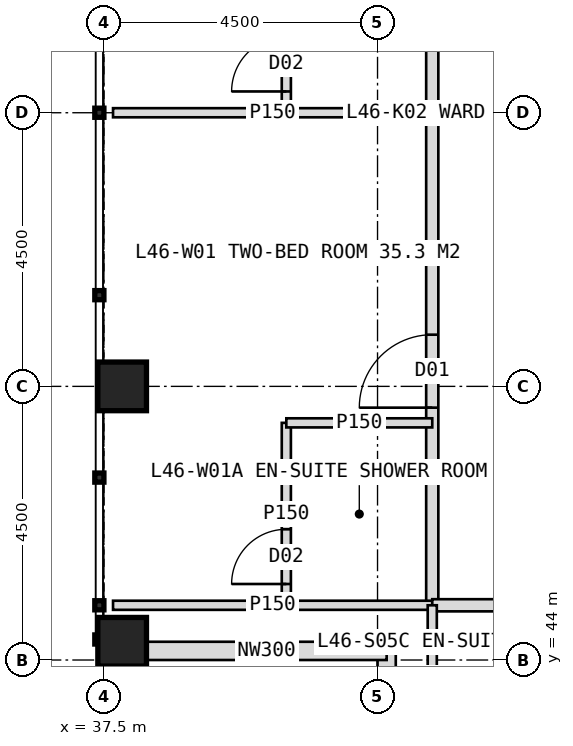
"""IFC4 building model, lengths in metres.
Left out: names, types, materials, properties, quantities, classifications, styles, units other than length and angle.
Written with IfcOpenShell. Run it as: python <this file> out.ifc"""

import sys

from ifc_helpers import new_model, si_unit, direction, frame, frame_2d, origin, origin_2d, place, context, subcontext, project, spatial, rectangle, hollow_rectangle, extrude, element, fill, save


model = new_model("IFC4")
c1 = context("Model", 3, precision=1e-05, world=origin(), true_north=direction((0.0, 1.0)))
c2 = subcontext(c1, "Body", "Model", "MODEL_VIEW")
j1 = project(units=[si_unit("LENGTHUNIT", "METRE"), si_unit("PLANEANGLEUNIT", "RADIAN")], contexts=[c1])
p1 = place(None, origin())
s1 = spatial("IfcSite", under=j1, at=p1, CompositionType="ELEMENT")
p2 = place(p1, origin())
s2 = spatial("IfcBuilding", under=s1, at=p2, CompositionType="ELEMENT")
p3 = place(p2, frame((0.0, 0.0, 193.0)))
s3 = spatial("IfcBuildingStorey", under=s2, at=p3, CompositionType="ELEMENT", Elevation=193.0)
for number, where, z_axis, x_axis in (
    (1, (37.8, 44.3, 0.0), (0.0, 0.0, 1.0), (1.0, 0.0, 0.0)),
    (2, (37.8, 48.5, 0.0), (0.0, 0.0, 1.0), (1.0, 0.0, 0.0)),
):
    element("IfcColumn", number, at=place(p3, frame(where, z_axis=z_axis, x_axis=x_axis)), inside=s3, PredefinedType="COLUMN", context=c2, shape_type="SweptSolid", body=[
        extrude(hollow_rectangle(XDim=0.8, YDim=0.8, WallThickness=0.08, at=origin_2d()), origin(), (0.0, 0.0, 1.0), 4.0),
    ])
for number, where, z_axis, x_axis in (
    (3, (42.15, 40.2, 0.0), (0.0, 0.0, 1.0), (0.0, 1.0, 0.0)),
    (4, (42.15, 44.15, 0.0), (0.0, 0.0, 1.0), (-1.0, 0.0, 0.0)),
):
    element("IfcWall", number, at=place(p3, frame(where, z_axis=z_axis, x_axis=x_axis)), inside=s3, PredefinedType="ELEMENTEDWALL", context=c2, shape_type="SweptSolid", body=[
        extrude(rectangle(XDim=3.95, YDim=0.3, at=frame_2d((1.975, 0.0))), origin(), (0.0, 0.0, 1.0), 2.85),
    ])
p4 = place(p3, frame((42.9, 53.0, 0.0), z_axis=(0.0, 0.0, 1.0), x_axis=(-1.0, 0.0, 0.0)))
e5 = element("IfcWall", 5, at=p4, inside=s3, PredefinedType="PARTITIONING", context=c2, shape_type="SweptSolid", body=[
    extrude(rectangle(XDim=5.25, YDim=0.15, at=frame_2d((2.625, 0.0))), origin(), (0.0, 0.0, 1.0), 3.75),
])
p5 = place(p3, frame((42.9, 44.9, 0.0), z_axis=(0.0, 0.0, 1.0), x_axis=(0.0, 1.0, 0.0)))
e6 = element("IfcWall", 6, at=p5, inside=s3, PredefinedType="PARTITIONING", context=c2, shape_type="SweptSolid", body=[
    extrude(rectangle(XDim=34.2, YDim=0.2, at=frame_2d((17.1, 0.0))), origin(), (0.0, 0.0, 1.0), 3.75),
])
p6 = place(p5, frame((3.25, 0.0, 0.0)))
e7 = element("IfcOpeningElement", 7, at=p6, cuts=e6, PredefinedType="OPENING", context=c2, shape_type="SweptSolid", body=[
    extrude(rectangle(XDim=1.2, YDim=2.2, at=frame_2d((0.6, 1.1))), frame((0.0, 0.11, 0.0), z_axis=(0.0, -1.0, 0.0), x_axis=(1.0, 0.0, 0.0)), (0.0, 0.0, 1.0), 0.22),
])
p7 = place(p5, frame((11.35, 0.0, 0.0)))
e8 = element("IfcOpeningElement", 8, at=p7, cuts=e6, PredefinedType="OPENING", context=c2, shape_type="SweptSolid", body=[
    extrude(rectangle(XDim=1.2, YDim=2.2, at=frame_2d((0.6, 1.1))), frame((0.0, 0.11, 0.0), z_axis=(0.0, -1.0, 0.0), x_axis=(1.0, 0.0, 0.0)), (0.0, 0.0, 1.0), 0.22),
])
p8 = place(p5, frame((20.35, 0.0, 0.0)))
e9 = element("IfcOpeningElement", 9, at=p8, cuts=e6, PredefinedType="OPENING", context=c2, shape_type="SweptSolid", body=[
    extrude(rectangle(XDim=1.2, YDim=2.2, at=frame_2d((0.6, 1.1))), frame((0.0, 0.11, 0.0), z_axis=(0.0, -1.0, 0.0), x_axis=(1.0, 0.0, 0.0)), (0.0, 0.0, 1.0), 0.22),
])
p9 = place(p5, frame((29.35, 0.0, 0.0)))
e10 = element("IfcOpeningElement", 10, at=p9, cuts=e6, PredefinedType="OPENING", context=c2, shape_type="SweptSolid", body=[
    extrude(rectangle(XDim=1.2, YDim=2.2, at=frame_2d((0.6, 1.1))), frame((0.0, 0.11, 0.0), z_axis=(0.0, -1.0, 0.0), x_axis=(1.0, 0.0, 0.0)), (0.0, 0.0, 1.0), 0.22),
])
p10 = place(p3, frame((42.9, 44.9, 0.0), z_axis=(0.0, 0.0, 1.0), x_axis=(-1.0, 0.0, 0.0)))
e11 = element("IfcWall", 11, at=p10, inside=s3, PredefinedType="PARTITIONING", context=c2, shape_type="SweptSolid", body=[
    extrude(rectangle(XDim=5.25, YDim=0.15, at=frame_2d((2.625, 0.0))), origin(), (0.0, 0.0, 1.0), 3.75),
])
p11 = place(p3, frame((40.5, 44.9, 0.0), z_axis=(0.0, 0.0, 1.0), x_axis=(0.0, 1.0, 0.0)))
e12 = element("IfcWall", 12, at=p11, inside=s3, PredefinedType="PARTITIONING", context=c2, shape_type="SweptSolid", body=[
    extrude(rectangle(XDim=3.0, YDim=0.15, at=frame_2d((1.5, 0.0))), origin(), (0.0, 0.0, 1.0), 3.75),
])
p12 = place(p11, frame((0.35, 0.0, 0.0)))
e13 = element("IfcOpeningElement", 13, at=p12, cuts=e12, PredefinedType="OPENING", context=c2, shape_type="SweptSolid", body=[
    extrude(rectangle(XDim=0.9, YDim=2.1, at=frame_2d((0.45, 1.05))), frame((0.0, 0.085, 0.0), z_axis=(0.0, -1.0, 0.0), x_axis=(1.0, 0.0, 0.0)), (0.0, 0.0, 1.0), 0.17),
])
p13 = place(p3, frame((42.9, 47.9, 0.0), z_axis=(0.0, 0.0, 1.0), x_axis=(-1.0, 0.0, 0.0)))
e14 = element("IfcWall", 14, at=p13, inside=s3, PredefinedType="PARTITIONING", context=c2, shape_type="SweptSolid", body=[
    extrude(rectangle(XDim=2.4, YDim=0.15, at=frame_2d((1.2, 0.0))), origin(), (0.0, 0.0, 1.0), 3.75),
])
p14 = place(p3, frame((40.5, 53.0, 0.0), z_axis=(0.0, 0.0, 1.0), x_axis=(0.0, 1.0, 0.0)))
e15 = element("IfcWall", 15, at=p14, inside=s3, PredefinedType="PARTITIONING", context=c2, shape_type="SweptSolid", body=[
    extrude(rectangle(XDim=3.0, YDim=0.15, at=frame_2d((1.5, 0.0))), origin(), (0.0, 0.0, 1.0), 3.75),
])
p15 = place(p14, frame((0.35, 0.0, 0.0)))
e16 = element("IfcOpeningElement", 16, at=p15, cuts=e15, PredefinedType="OPENING", context=c2, shape_type="SweptSolid", body=[
    extrude(rectangle(XDim=0.9, YDim=2.1, at=frame_2d((0.45, 1.05))), frame((0.0, 0.085, 0.0), z_axis=(0.0, -1.0, 0.0), x_axis=(1.0, 0.0, 0.0)), (0.0, 0.0, 1.0), 0.17),
])
p16 = place(p3, frame((77.1, 44.9, 0.0), z_axis=(0.0, 0.0, 1.0), x_axis=(-1.0, 0.0, 0.0)))
e17 = element("IfcWall", 17, at=p16, inside=s3, PredefinedType="PARTITIONING", context=c2, shape_type="SweptSolid", body=[
    extrude(rectangle(XDim=34.2, YDim=0.2, at=frame_2d((17.1, 0.0))), origin(), (0.0, 0.0, 1.0), 3.75),
])
p17 = place(p16, frame((2.65, 0.0, 0.0)))
e18 = element("IfcOpeningElement", 18, at=p17, cuts=e17, PredefinedType="OPENING", context=c2, shape_type="SweptSolid", body=[
    extrude(rectangle(XDim=1.2, YDim=2.2, at=frame_2d((0.6, 1.1))), frame((0.0, 0.11, 0.0), z_axis=(0.0, -1.0, 0.0), x_axis=(1.0, 0.0, 0.0)), (0.0, 0.0, 1.0), 0.22),
])
p18 = place(p16, frame((7.75, 0.0, 0.0)))
e19 = element("IfcOpeningElement", 19, at=p18, cuts=e17, PredefinedType="OPENING", context=c2, shape_type="SweptSolid", body=[
    extrude(rectangle(XDim=1.2, YDim=2.2, at=frame_2d((0.6, 1.1))), frame((0.0, 0.11, 0.0), z_axis=(0.0, -1.0, 0.0), x_axis=(1.0, 0.0, 0.0)), (0.0, 0.0, 1.0), 0.22),
])
p19 = place(p16, frame((13.75, 0.0, 0.0)))
e20 = element("IfcOpeningElement", 20, at=p19, cuts=e17, PredefinedType="OPENING", context=c2, shape_type="SweptSolid", body=[
    extrude(rectangle(XDim=1.2, YDim=2.2, at=frame_2d((0.6, 1.1))), frame((0.0, 0.11, 0.0), z_axis=(0.0, -1.0, 0.0), x_axis=(1.0, 0.0, 0.0)), (0.0, 0.0, 1.0), 0.22),
])
p20 = place(p16, frame((19.75, 0.0, 0.0)))
e21 = element("IfcOpeningElement", 21, at=p20, cuts=e17, PredefinedType="OPENING", context=c2, shape_type="SweptSolid", body=[
    extrude(rectangle(XDim=1.2, YDim=2.2, at=frame_2d((0.6, 1.1))), frame((0.0, 0.11, 0.0), z_axis=(0.0, -1.0, 0.0), x_axis=(1.0, 0.0, 0.0)), (0.0, 0.0, 1.0), 0.22),
])
p21 = place(p16, frame((25.75, 0.0, 0.0)))
e22 = element("IfcOpeningElement", 22, at=p21, cuts=e17, PredefinedType="OPENING", context=c2, shape_type="SweptSolid", body=[
    extrude(rectangle(XDim=1.2, YDim=2.2, at=frame_2d((0.6, 1.1))), frame((0.0, 0.11, 0.0), z_axis=(0.0, -1.0, 0.0), x_axis=(1.0, 0.0, 0.0)), (0.0, 0.0, 1.0), 0.22),
])
p22 = place(p3, frame((42.9, 44.9, 0.0), z_axis=(0.0, 0.0, 1.0), x_axis=(0.0, -1.0, 0.0)))
e23 = element("IfcWall", 23, at=p22, inside=s3, PredefinedType="PARTITIONING", context=c2, shape_type="SweptSolid", body=[
    extrude(rectangle(XDim=2.4, YDim=0.15, at=frame_2d((1.2, 0.0))), origin(), (0.0, 0.0, 1.0), 3.75),
])
p23 = place(p6, origin())
e24 = element("IfcDoor", 24, at=p23, inside=s3, OperationType="SINGLE_SWING_LEFT", PredefinedType="DOOR", context=c2, shape_type="SweptSolid", body=[
    extrude(rectangle(XDim=1.2, YDim=2.2, at=frame_2d((0.6, 1.1))), frame((0.0, 0.025, 0.0), z_axis=(0.0, -1.0, 0.0), x_axis=(1.0, 0.0, 0.0)), (0.0, 0.0, 1.0), 0.05),
])
fill(e7, e24)
p24 = place(p12, origin())
e25 = element("IfcDoor", 25, at=p24, inside=s3, OperationType="SINGLE_SWING_LEFT", PredefinedType="DOOR", context=c2, shape_type="SweptSolid", body=[
    extrude(rectangle(XDim=0.9, YDim=2.1, at=frame_2d((0.45, 1.05))), frame((0.0, 0.025, 0.0), z_axis=(0.0, -1.0, 0.0), x_axis=(1.0, 0.0, 0.0)), (0.0, 0.0, 1.0), 0.05),
])
fill(e13, e25)
p25 = place(p15, origin())
e26 = element("IfcDoor", 26, at=p25, inside=s3, OperationType="SINGLE_SWING_LEFT", PredefinedType="DOOR", context=c2, shape_type="SweptSolid", body=[
    extrude(rectangle(XDim=0.9, YDim=2.1, at=frame_2d((0.45, 1.05))), frame((0.0, 0.025, 0.0), z_axis=(0.0, -1.0, 0.0), x_axis=(1.0, 0.0, 0.0)), (0.0, 0.0, 1.0), 0.05),
])
fill(e16, e26)
save(model, sys.argv[1])
